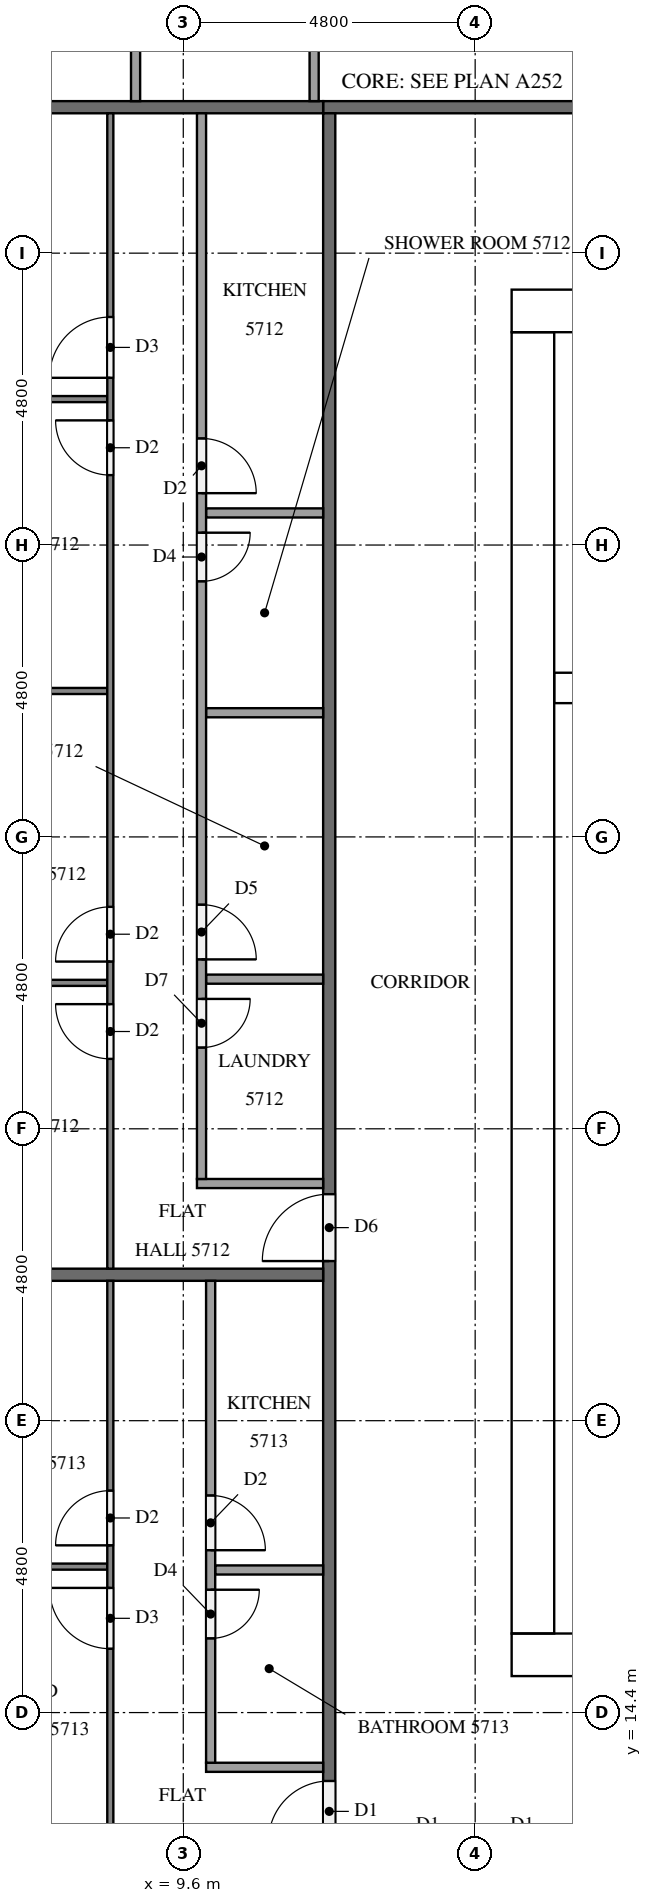
"""IFC4 building model, lengths in metres.
Left out: names, types, materials, properties, quantities, classifications, styles, units other than length and angle.
Written with IfcOpenShell. Run it as: python <this file> out.ifc"""

import sys

from ifc_helpers import new_model, si_unit, direction, frame, frame_2d, origin, place, context, subcontext, project, spatial, rectangle, extrude, element, fill, save


model = new_model("IFC4")
c1 = context("Model", 3, precision=1e-05, world=origin(), true_north=direction((0.0, 1.0)))
c2 = subcontext(c1, "Body", "Model", "MODEL_VIEW")
j1 = project(units=[si_unit("LENGTHUNIT", "METRE"), si_unit("PLANEANGLEUNIT", "RADIAN")], contexts=[c1])
p1 = place(None, origin())
s1 = spatial("IfcSite", under=j1, at=p1, CompositionType="ELEMENT")
p2 = place(p1, origin())
s2 = spatial("IfcBuilding", under=s1, at=p2, CompositionType="ELEMENT")
p3 = place(p2, frame((0.0, 0.0, 219.3)))
s3 = spatial("IfcBuildingStorey", under=s2, at=p3, CompositionType="ELEMENT", Elevation=219.3)
p4 = place(p3, frame((15.0, 15.35, 0.0), z_axis=(0.0, 0.0, 1.0), x_axis=(1.0, 0.0, 0.0)))
e1 = element("IfcWall", 1, at=p4, inside=s3, PredefinedType="SHEAR", context=c2, shape_type="SweptSolid", body=[
    extrude(rectangle(XDim=32.4, YDim=0.7, at=frame_2d((16.2, 0.0))), origin(), (0.0, 0.0, 1.0), 3.2),
])
p5 = place(p4, frame((15.3, 0.0, 0.0)))
e2 = element("IfcOpeningElement", 2, at=p5, cuts=e1, PredefinedType="OPENING", context=c2, shape_type="SweptSolid", body=[
    extrude(rectangle(XDim=1.8, YDim=2.1, at=frame_2d((0.9, 1.05))), frame((0.0, 0.36, 0.0), z_axis=(0.0, -1.0, 0.0), x_axis=(1.0, 0.0, 0.0)), (0.0, 0.0, 1.0), 0.72),
])
p6 = place(p3, frame((15.0, 37.45, 0.0), z_axis=(0.0, 0.0, 1.0), x_axis=(1.0, 0.0, 0.0)))
e3 = element("IfcWall", 3, at=p6, inside=s3, PredefinedType="SHEAR", context=c2, shape_type="SweptSolid", body=[
    extrude(rectangle(XDim=32.4, YDim=0.7, at=frame_2d((16.2, 0.0))), origin(), (0.0, 0.0, 1.0), 3.2),
])
p7 = place(p6, frame((15.3, 0.0, 0.0)))
e4 = element("IfcOpeningElement", 4, at=p7, cuts=e3, PredefinedType="OPENING", context=c2, shape_type="SweptSolid", body=[
    extrude(rectangle(XDim=1.8, YDim=2.1, at=frame_2d((0.9, 1.05))), frame((0.0, 0.36, 0.0), z_axis=(0.0, -1.0, 0.0), x_axis=(1.0, 0.0, 0.0)), (0.0, 0.0, 1.0), 0.72),
])
p8 = place(p6, frame((1.544, 0.0, 0.0)))
e5 = element("IfcOpeningElement", 5, at=p8, cuts=e3, PredefinedType="OPENING", context=c2, shape_type="SweptSolid", body=[
    extrude(rectangle(XDim=1.0, YDim=2.1, at=frame_2d((0.5, 1.05))), frame((0.0, 0.36, 0.0), z_axis=(0.0, -1.0, 0.0), x_axis=(1.0, 0.0, 0.0)), (0.0, 0.0, 1.0), 0.72),
])
p9 = place(p6, frame((5.219, 0.0, 0.0)))
e6 = element("IfcOpeningElement", 6, at=p9, cuts=e3, PredefinedType="OPENING", context=c2, shape_type="SweptSolid", body=[
    extrude(rectangle(XDim=1.0, YDim=2.1, at=frame_2d((0.5, 1.05))), frame((0.0, 0.36, 0.0), z_axis=(0.0, -1.0, 0.0), x_axis=(1.0, 0.0, 0.0)), (0.0, 0.0, 1.0), 0.72),
])
p10 = place(p3, frame((15.35, 15.7, 0.0), z_axis=(0.0, 0.0, 1.0), x_axis=(0.0, 1.0, 0.0)))
e7 = element("IfcWall", 7, at=p10, inside=s3, PredefinedType="SHEAR", context=c2, shape_type="SweptSolid", body=[
    extrude(rectangle(XDim=21.4, YDim=0.7, at=frame_2d((10.7, 0.0))), origin(), (0.0, 0.0, 1.0), 3.2),
])
p11 = place(p10, frame((5.06, 0.0, 0.0)))
e8 = element("IfcOpeningElement", 8, at=p11, cuts=e7, PredefinedType="OPENING", context=c2, shape_type="SweptSolid", body=[
    extrude(rectangle(XDim=1.2, YDim=2.1, at=frame_2d((0.6, 1.05))), frame((0.0, 0.36, 0.0), z_axis=(0.0, -1.0, 0.0), x_axis=(1.0, 0.0, 0.0)), (0.0, 0.0, 1.0), 0.72),
])
p12 = place(p3, frame((15.7, 31.25, 0.0), z_axis=(0.0, 0.0, 1.0), x_axis=(1.0, 0.0, 0.0)))
e9 = element("IfcWall", 9, at=p12, inside=s3, PredefinedType="SHEAR", context=c2, shape_type="SweptSolid", body=[
    extrude(rectangle(XDim=7.15, YDim=0.5, at=frame_2d((3.575, 0.0))), origin(), (0.0, 0.0, 1.0), 3.2),
])
p13 = place(p3, frame((11.9, 40.8, 0.0), z_axis=(0.0, 0.0, 1.0), x_axis=(1.0, 0.0, 0.0)))
e10 = element("IfcWall", 10, at=p13, inside=s3, PredefinedType="PARTITIONING", context=c2, shape_type="SweptSolid", body=[
    extrude(rectangle(XDim=38.6, YDim=0.2, at=frame_2d((19.3, 0.0))), origin(), (0.0, 0.0, 1.0), 3.2),
])
p14 = place(p13, frame((33.975, 0.0, 0.0)))
e11 = element("IfcOpeningElement", 11, at=p14, cuts=e10, PredefinedType="OPENING", context=c2, shape_type="SweptSolid", body=[
    extrude(rectangle(XDim=1.0, YDim=2.1, at=frame_2d((0.5, 1.05))), frame((0.0, 0.11, 0.0), z_axis=(0.0, -1.0, 0.0), x_axis=(1.0, 0.0, 0.0)), (0.0, 0.0, 1.0), 0.22),
])
p15 = place(p13, frame((14.725, 0.0, 0.0)))
e12 = element("IfcOpeningElement", 12, at=p15, cuts=e10, PredefinedType="OPENING", context=c2, shape_type="SweptSolid", body=[
    extrude(rectangle(XDim=1.1, YDim=2.1, at=frame_2d((0.55, 1.05))), frame((0.0, 0.11, 0.0), z_axis=(0.0, -1.0, 0.0), x_axis=(1.0, 0.0, 0.0)), (0.0, 0.0, 1.0), 0.22),
])
p16 = place(p13, frame((7.575, 0.0, 0.0)))
e13 = element("IfcOpeningElement", 13, at=p16, cuts=e10, PredefinedType="OPENING", context=c2, shape_type="SweptSolid", body=[
    extrude(rectangle(XDim=1.0, YDim=2.1, at=frame_2d((0.5, 1.05))), frame((0.0, 0.11, 0.0), z_axis=(0.0, -1.0, 0.0), x_axis=(1.0, 0.0, 0.0)), (0.0, 0.0, 1.0), 0.22),
])
p17 = place(p13, frame((6.025, 0.0, 0.0)))
e14 = element("IfcOpeningElement", 14, at=p17, cuts=e10, PredefinedType="OPENING", context=c2, shape_type="SweptSolid", body=[
    extrude(rectangle(XDim=1.0, YDim=2.1, at=frame_2d((0.5, 1.05))), frame((0.0, 0.11, 0.0), z_axis=(0.0, -1.0, 0.0), x_axis=(1.0, 0.0, 0.0)), (0.0, 0.0, 1.0), 0.22),
])
p18 = place(p3, frame((12.0, 12.1, 0.0), z_axis=(0.0, 0.0, 1.0), x_axis=(0.0, 1.0, 0.0)))
e15 = element("IfcWall", 15, at=p18, inside=s3, PredefinedType="PARTITIONING", context=c2, shape_type="SweptSolid", body=[
    extrude(rectangle(XDim=28.6, YDim=0.2, at=frame_2d((14.3, 0.0))), origin(), (0.0, 0.0, 1.0), 3.2),
])
p19 = place(p18, frame((9.725, 0.0, 0.0)))
e16 = element("IfcOpeningElement", 16, at=p19, cuts=e15, PredefinedType="OPENING", context=c2, shape_type="SweptSolid", body=[
    extrude(rectangle(XDim=1.1, YDim=2.1, at=frame_2d((0.55, 1.05))), frame((0.0, 0.11, 0.0), z_axis=(0.0, -1.0, 0.0), x_axis=(1.0, 0.0, 0.0)), (0.0, 0.0, 1.0), 0.22),
])
p20 = place(p18, frame((0.175, 0.0, 0.0)))
e17 = element("IfcOpeningElement", 17, at=p20, cuts=e15, PredefinedType="OPENING", context=c2, shape_type="SweptSolid", body=[
    extrude(rectangle(XDim=1.0, YDim=2.1, at=frame_2d((0.5, 1.05))), frame((0.0, 0.11, 0.0), z_axis=(0.0, -1.0, 0.0), x_axis=(1.0, 0.0, 0.0)), (0.0, 0.0, 1.0), 0.22),
])
for number, where, z_axis, x_axis in (
    (18, (4.9, 40.8, 0.0), (0.0, 0.0, 1.0), (1.0, 0.0, 0.0)),
    (19, (4.9, 21.6, 0.0), (0.0, 0.0, 1.0), (1.0, 0.0, 0.0)),
):
    element("IfcWall", number, at=place(p3, frame(where, z_axis=z_axis, x_axis=x_axis)), inside=s3, PredefinedType="PARTITIONING", context=c2, shape_type="SweptSolid", body=[
        extrude(rectangle(XDim=7.0, YDim=0.2, at=frame_2d((3.5, 0.0))), origin(), (0.0, 0.0, 1.0), 3.2),
    ])
for number, where, z_axis, x_axis in (
    (20, (11.752, 40.9, 0.0), (0.0, 0.0, 1.0), (0.0, 1.0, 0.0)),
    (21, (8.815, 40.9, 0.0), (0.0, 0.0, 1.0), (0.0, 1.0, 0.0)),
):
    element("IfcWall", number, at=place(p3, frame(where, z_axis=z_axis, x_axis=x_axis)), inside=s3, PredefinedType="PARTITIONING", context=c2, shape_type="SweptSolid", body=[
        extrude(rectangle(XDim=2.975, YDim=0.15, at=frame_2d((1.488, 0.0))), origin(), (0.0, 0.0, 1.0), 3.2),
    ])
for number, where, z_axis, x_axis in (
    (22, (8.35, 26.4, 0.0), (0.0, 0.0, 1.0), (-1.0, 0.0, 0.0)),
    (23, (8.35, 31.2, 0.0), (0.0, 0.0, 1.0), (-1.0, 0.0, 0.0)),
    (24, (8.35, 36.0, 0.0), (0.0, 0.0, 1.0), (-1.0, 0.0, 0.0)),
):
    element("IfcWall", number, at=place(p3, frame(where, z_axis=z_axis, x_axis=x_axis)), inside=s3, PredefinedType="PARTITIONING", context=c2, shape_type="SweptSolid", body=[
        extrude(rectangle(XDim=3.45, YDim=0.1, at=frame_2d((1.725, 0.0))), origin(), (0.0, 0.0, 1.0), 3.2),
    ])
p21 = place(p3, frame((8.4, 21.7, 0.0), z_axis=(0.0, 0.0, 1.0), x_axis=(0.0, 1.0, 0.0)))
e25 = element("IfcWall", 25, at=p21, inside=s3, PredefinedType="PARTITIONING", context=c2, shape_type="SweptSolid", body=[
    extrude(rectangle(XDim=19.0, YDim=0.1, at=frame_2d((9.5, 0.0))), origin(), (0.0, 0.0, 1.0), 3.2),
])
p22 = place(p21, frame((3.45, 0.0, 0.0)))
e26 = element("IfcOpeningElement", 26, at=p22, cuts=e25, PredefinedType="OPENING", context=c2, shape_type="SweptSolid", body=[
    extrude(rectangle(XDim=0.9, YDim=2.1, at=frame_2d((0.45, 1.05))), frame((0.0, 0.06, 0.0), z_axis=(0.0, -1.0, 0.0), x_axis=(1.0, 0.0, 0.0)), (0.0, 0.0, 1.0), 0.12),
])
p23 = place(p21, frame((5.05, 0.0, 0.0)))
e27 = element("IfcOpeningElement", 27, at=p23, cuts=e25, PredefinedType="OPENING", context=c2, shape_type="SweptSolid", body=[
    extrude(rectangle(XDim=0.9, YDim=2.1, at=frame_2d((0.45, 1.05))), frame((0.0, 0.06, 0.0), z_axis=(0.0, -1.0, 0.0), x_axis=(1.0, 0.0, 0.0)), (0.0, 0.0, 1.0), 0.12),
])
p24 = place(p21, frame((13.05, 0.0, 0.0)))
e28 = element("IfcOpeningElement", 28, at=p24, cuts=e25, PredefinedType="OPENING", context=c2, shape_type="SweptSolid", body=[
    extrude(rectangle(XDim=0.9, YDim=2.1, at=frame_2d((0.45, 1.05))), frame((0.0, 0.06, 0.0), z_axis=(0.0, -1.0, 0.0), x_axis=(1.0, 0.0, 0.0)), (0.0, 0.0, 1.0), 0.12),
])
p25 = place(p21, frame((14.65, 0.0, 0.0)))
e29 = element("IfcOpeningElement", 29, at=p25, cuts=e25, PredefinedType="OPENING", context=c2, shape_type="SweptSolid", body=[
    extrude(rectangle(XDim=1.0, YDim=2.1, at=frame_2d((0.5, 1.05))), frame((0.0, 0.06, 0.0), z_axis=(0.0, -1.0, 0.0), x_axis=(1.0, 0.0, 0.0)), (0.0, 0.0, 1.0), 0.12),
])
for number, where, z_axis, x_axis in (
    (30, (11.9, 26.461, 0.0), (0.0, 0.0, 1.0), (-1.0, 0.0, 0.0)),
    (31, (11.9, 30.842, 0.0), (0.0, 0.0, 1.0), (-1.0, 0.0, 0.0)),
    (32, (11.9, 34.128, 0.0), (0.0, 0.0, 1.0), (-1.0, 0.0, 0.0)),
):
    element("IfcWall", number, at=place(p3, frame(where, z_axis=z_axis, x_axis=x_axis)), inside=s3, PredefinedType="PARTITIONING", context=c2, shape_type="SweptSolid", body=[
        extrude(rectangle(XDim=1.925, YDim=0.15, at=frame_2d((0.962, 0.0))), origin(), (0.0, 0.0, 1.0), 3.2),
    ])
p26 = place(p3, frame((11.9, 23.1, 0.0), z_axis=(0.0, 0.0, 1.0), x_axis=(-1.0, 0.0, 0.0)))
e33 = element("IfcWall", 33, at=p26, inside=s3, PredefinedType="PARTITIONING", context=c2, shape_type="SweptSolid", body=[
    extrude(rectangle(XDim=2.075, YDim=0.15, at=frame_2d((1.038, 0.0))), origin(), (0.0, 0.0, 1.0), 3.2),
])
p27 = place(p3, frame((9.9, 40.7, 0.0), z_axis=(0.0, 0.0, 1.0), x_axis=(0.0, -1.0, 0.0)))
e34 = element("IfcWall", 34, at=p27, inside=s3, PredefinedType="PARTITIONING", context=c2, shape_type="SweptSolid", body=[
    extrude(rectangle(XDim=17.525, YDim=0.15, at=frame_2d((8.762, 0.0))), origin(), (0.0, 0.0, 1.0), 3.2),
])
p28 = place(p27, frame((14.564, 0.0, 0.0)))
e35 = element("IfcOpeningElement", 35, at=p28, cuts=e34, PredefinedType="OPENING", context=c2, shape_type="SweptSolid", body=[
    extrude(rectangle(XDim=0.8, YDim=2.1, at=frame_2d((0.4, 1.05))), frame((0.0, 0.085, 0.0), z_axis=(0.0, -1.0, 0.0), x_axis=(1.0, 0.0, 0.0)), (0.0, 0.0, 1.0), 0.17),
])
p29 = place(p27, frame((13.014, 0.0, 0.0)))
e36 = element("IfcOpeningElement", 36, at=p29, cuts=e34, PredefinedType="OPENING", context=c2, shape_type="SweptSolid", body=[
    extrude(rectangle(XDim=0.9, YDim=2.1, at=frame_2d((0.45, 1.05))), frame((0.0, 0.085, 0.0), z_axis=(0.0, -1.0, 0.0), x_axis=(1.0, 0.0, 0.0)), (0.0, 0.0, 1.0), 0.17),
])
p30 = place(p27, frame((6.897, 0.0, 0.0)))
e37 = element("IfcOpeningElement", 37, at=p30, cuts=e34, PredefinedType="OPENING", context=c2, shape_type="SweptSolid", body=[
    extrude(rectangle(XDim=0.8, YDim=2.1, at=frame_2d((0.4, 1.05))), frame((0.0, 0.085, 0.0), z_axis=(0.0, -1.0, 0.0), x_axis=(1.0, 0.0, 0.0)), (0.0, 0.0, 1.0), 0.17),
])
p31 = place(p27, frame((5.347, 0.0, 0.0)))
e38 = element("IfcOpeningElement", 38, at=p31, cuts=e34, PredefinedType="OPENING", context=c2, shape_type="SweptSolid", body=[
    extrude(rectangle(XDim=0.9, YDim=2.1, at=frame_2d((0.45, 1.05))), frame((0.0, 0.085, 0.0), z_axis=(0.0, -1.0, 0.0), x_axis=(1.0, 0.0, 0.0)), (0.0, 0.0, 1.0), 0.17),
])
p32 = place(p3, frame((8.35, 16.8, 0.0), z_axis=(0.0, 0.0, 1.0), x_axis=(-1.0, 0.0, 0.0)))
e39 = element("IfcWall", 39, at=p32, inside=s3, PredefinedType="PARTITIONING", context=c2, shape_type="SweptSolid", body=[
    extrude(rectangle(XDim=3.45, YDim=0.1, at=frame_2d((1.725, 0.0))), origin(), (0.0, 0.0, 1.0), 3.2),
])
p33 = place(p3, frame((8.4, 12.1, 0.0), z_axis=(0.0, 0.0, 1.0), x_axis=(0.0, 1.0, 0.0)))
e40 = element("IfcWall", 40, at=p33, inside=s3, PredefinedType="PARTITIONING", context=c2, shape_type="SweptSolid", body=[
    extrude(rectangle(XDim=9.4, YDim=0.1, at=frame_2d((4.7, 0.0))), origin(), (0.0, 0.0, 1.0), 3.2),
])
p34 = place(p33, frame((3.35, 0.0, 0.0)))
e41 = element("IfcOpeningElement", 41, at=p34, cuts=e40, PredefinedType="OPENING", context=c2, shape_type="SweptSolid", body=[
    extrude(rectangle(XDim=1.0, YDim=2.1, at=frame_2d((0.5, 1.05))), frame((0.0, 0.06, 0.0), z_axis=(0.0, -1.0, 0.0), x_axis=(1.0, 0.0, 0.0)), (0.0, 0.0, 1.0), 0.12),
])
p35 = place(p33, frame((5.05, 0.0, 0.0)))
e42 = element("IfcOpeningElement", 42, at=p35, cuts=e40, PredefinedType="OPENING", context=c2, shape_type="SweptSolid", body=[
    extrude(rectangle(XDim=0.9, YDim=2.1, at=frame_2d((0.45, 1.05))), frame((0.0, 0.06, 0.0), z_axis=(0.0, -1.0, 0.0), x_axis=(1.0, 0.0, 0.0)), (0.0, 0.0, 1.0), 0.12),
])
p36 = place(p3, frame((11.9, 16.745, 0.0), z_axis=(0.0, 0.0, 1.0), x_axis=(-1.0, 0.0, 0.0)))
e43 = element("IfcWall", 43, at=p36, inside=s3, PredefinedType="PARTITIONING", context=c2, shape_type="SweptSolid", body=[
    extrude(rectangle(XDim=1.775, YDim=0.15, at=frame_2d((0.887, 0.0))), origin(), (0.0, 0.0, 1.0), 3.2),
])
p37 = place(p3, frame((11.9, 13.5, 0.0), z_axis=(0.0, 0.0, 1.0), x_axis=(-1.0, 0.0, 0.0)))
e44 = element("IfcWall", 44, at=p37, inside=s3, PredefinedType="PARTITIONING", context=c2, shape_type="SweptSolid", body=[
    extrude(rectangle(XDim=1.925, YDim=0.15, at=frame_2d((0.962, 0.0))), origin(), (0.0, 0.0, 1.0), 3.2),
])
p38 = place(p3, frame((10.05, 21.5, 0.0), z_axis=(0.0, 0.0, 1.0), x_axis=(0.0, -1.0, 0.0)))
e45 = element("IfcWall", 45, at=p38, inside=s3, PredefinedType="PARTITIONING", context=c2, shape_type="SweptSolid", body=[
    extrude(rectangle(XDim=7.925, YDim=0.15, at=frame_2d((3.962, 0.0))), origin(), (0.0, 0.0, 1.0), 3.2),
])
p39 = place(p38, frame((5.08, 0.0, 0.0)))
e46 = element("IfcOpeningElement", 46, at=p39, cuts=e45, PredefinedType="OPENING", context=c2, shape_type="SweptSolid", body=[
    extrude(rectangle(XDim=0.8, YDim=2.1, at=frame_2d((0.4, 1.05))), frame((0.0, 0.085, 0.0), z_axis=(0.0, -1.0, 0.0), x_axis=(1.0, 0.0, 0.0)), (0.0, 0.0, 1.0), 0.17),
])
p40 = place(p38, frame((3.53, 0.0, 0.0)))
e47 = element("IfcOpeningElement", 47, at=p40, cuts=e45, PredefinedType="OPENING", context=c2, shape_type="SweptSolid", body=[
    extrude(rectangle(XDim=0.9, YDim=2.1, at=frame_2d((0.45, 1.05))), frame((0.0, 0.085, 0.0), z_axis=(0.0, -1.0, 0.0), x_axis=(1.0, 0.0, 0.0)), (0.0, 0.0, 1.0), 0.17),
])
p41 = place(p11, frame((1.2, 0.0, 0.0), z_axis=(0.0, 0.0, 1.0), x_axis=(-1.0, 0.0, 0.0)))
e48 = element("IfcDoor", 48, at=p41, inside=s3, OperationType="SINGLE_SWING_RIGHT", PredefinedType="DOOR", context=c2, shape_type="SweptSolid", body=[
    extrude(rectangle(XDim=1.2, YDim=2.1, at=frame_2d((0.6, 1.05))), frame((0.0, 0.025, 0.0), z_axis=(0.0, -1.0, 0.0), x_axis=(1.0, 0.0, 0.0)), (0.0, 0.0, 1.0), 0.05),
])
fill(e8, e48)
p42 = place(p19, origin())
e49 = element("IfcDoor", 49, at=p42, inside=s3, OperationType="SINGLE_SWING_LEFT", PredefinedType="DOOR", context=c2, shape_type="SweptSolid", body=[
    extrude(rectangle(XDim=1.1, YDim=2.1, at=frame_2d((0.55, 1.05))), frame((0.0, 0.025, 0.0), z_axis=(0.0, -1.0, 0.0), x_axis=(1.0, 0.0, 0.0)), (0.0, 0.0, 1.0), 0.05),
])
fill(e16, e49)
p43 = place(p20, origin())
e50 = element("IfcDoor", 50, at=p43, inside=s3, OperationType="SINGLE_SWING_LEFT", PredefinedType="DOOR", context=c2, shape_type="SweptSolid", body=[
    extrude(rectangle(XDim=1.0, YDim=2.1, at=frame_2d((0.5, 1.05))), frame((0.0, 0.025, 0.0), z_axis=(0.0, -1.0, 0.0), x_axis=(1.0, 0.0, 0.0)), (0.0, 0.0, 1.0), 0.05),
])
fill(e17, e50)
p44 = place(p22, origin())
e51 = element("IfcDoor", 51, at=p44, inside=s3, OperationType="SINGLE_SWING_RIGHT", PredefinedType="DOOR", context=c2, shape_type="SweptSolid", body=[
    extrude(rectangle(XDim=0.9, YDim=2.1, at=frame_2d((0.45, 1.05))), frame((0.0, 0.025, 0.0), z_axis=(0.0, -1.0, 0.0), x_axis=(1.0, 0.0, 0.0)), (0.0, 0.0, 1.0), 0.05),
])
fill(e26, e51)
p45 = place(p23, origin())
e52 = element("IfcDoor", 52, at=p45, inside=s3, OperationType="SINGLE_SWING_LEFT", PredefinedType="DOOR", context=c2, shape_type="SweptSolid", body=[
    extrude(rectangle(XDim=0.9, YDim=2.1, at=frame_2d((0.45, 1.05))), frame((0.0, 0.025, 0.0), z_axis=(0.0, -1.0, 0.0), x_axis=(1.0, 0.0, 0.0)), (0.0, 0.0, 1.0), 0.05),
])
fill(e27, e52)
p46 = place(p24, origin())
e53 = element("IfcDoor", 53, at=p46, inside=s3, OperationType="SINGLE_SWING_RIGHT", PredefinedType="DOOR", context=c2, shape_type="SweptSolid", body=[
    extrude(rectangle(XDim=0.9, YDim=2.1, at=frame_2d((0.45, 1.05))), frame((0.0, 0.025, 0.0), z_axis=(0.0, -1.0, 0.0), x_axis=(1.0, 0.0, 0.0)), (0.0, 0.0, 1.0), 0.05),
])
fill(e28, e53)
p47 = place(p25, origin())
e54 = element("IfcDoor", 54, at=p47, inside=s3, OperationType="SINGLE_SWING_LEFT", PredefinedType="DOOR", context=c2, shape_type="SweptSolid", body=[
    extrude(rectangle(XDim=1.0, YDim=2.1, at=frame_2d((0.5, 1.05))), frame((0.0, 0.025, 0.0), z_axis=(0.0, -1.0, 0.0), x_axis=(1.0, 0.0, 0.0)), (0.0, 0.0, 1.0), 0.05),
])
fill(e29, e54)
p48 = place(p28, origin())
e55 = element("IfcDoor", 55, at=p48, inside=s3, OperationType="SINGLE_SWING_LEFT", PredefinedType="DOOR", context=c2, shape_type="SweptSolid", body=[
    extrude(rectangle(XDim=0.8, YDim=2.1, at=frame_2d((0.4, 1.05))), frame((0.0, 0.025, 0.0), z_axis=(0.0, -1.0, 0.0), x_axis=(1.0, 0.0, 0.0)), (0.0, 0.0, 1.0), 0.05),
])
fill(e35, e55)
p49 = place(p29, origin())
e56 = element("IfcDoor", 56, at=p49, inside=s3, OperationType="SINGLE_SWING_RIGHT", PredefinedType="DOOR", context=c2, shape_type="SweptSolid", body=[
    extrude(rectangle(XDim=0.9, YDim=2.1, at=frame_2d((0.45, 1.05))), frame((0.0, 0.025, 0.0), z_axis=(0.0, -1.0, 0.0), x_axis=(1.0, 0.0, 0.0)), (0.0, 0.0, 1.0), 0.05),
])
fill(e36, e56)
p50 = place(p30, origin())
e57 = element("IfcDoor", 57, at=p50, inside=s3, OperationType="SINGLE_SWING_LEFT", PredefinedType="DOOR", context=c2, shape_type="SweptSolid", body=[
    extrude(rectangle(XDim=0.8, YDim=2.1, at=frame_2d((0.4, 1.05))), frame((0.0, 0.025, 0.0), z_axis=(0.0, -1.0, 0.0), x_axis=(1.0, 0.0, 0.0)), (0.0, 0.0, 1.0), 0.05),
])
fill(e37, e57)
p51 = place(p31, origin())
e58 = element("IfcDoor", 58, at=p51, inside=s3, OperationType="SINGLE_SWING_RIGHT", PredefinedType="DOOR", context=c2, shape_type="SweptSolid", body=[
    extrude(rectangle(XDim=0.9, YDim=2.1, at=frame_2d((0.45, 1.05))), frame((0.0, 0.025, 0.0), z_axis=(0.0, -1.0, 0.0), x_axis=(1.0, 0.0, 0.0)), (0.0, 0.0, 1.0), 0.05),
])
fill(e38, e58)
p52 = place(p34, origin())
e59 = element("IfcDoor", 59, at=p52, inside=s3, OperationType="SINGLE_SWING_RIGHT", PredefinedType="DOOR", context=c2, shape_type="SweptSolid", body=[
    extrude(rectangle(XDim=1.0, YDim=2.1, at=frame_2d((0.5, 1.05))), frame((0.0, 0.025, 0.0), z_axis=(0.0, -1.0, 0.0), x_axis=(1.0, 0.0, 0.0)), (0.0, 0.0, 1.0), 0.05),
])
fill(e41, e59)
p53 = place(p35, origin())
e60 = element("IfcDoor", 60, at=p53, inside=s3, OperationType="SINGLE_SWING_LEFT", PredefinedType="DOOR", context=c2, shape_type="SweptSolid", body=[
    extrude(rectangle(XDim=0.9, YDim=2.1, at=frame_2d((0.45, 1.05))), frame((0.0, 0.025, 0.0), z_axis=(0.0, -1.0, 0.0), x_axis=(1.0, 0.0, 0.0)), (0.0, 0.0, 1.0), 0.05),
])
fill(e42, e60)
p54 = place(p39, origin())
e61 = element("IfcDoor", 61, at=p54, inside=s3, OperationType="SINGLE_SWING_LEFT", PredefinedType="DOOR", context=c2, shape_type="SweptSolid", body=[
    extrude(rectangle(XDim=0.8, YDim=2.1, at=frame_2d((0.4, 1.05))), frame((0.0, 0.025, 0.0), z_axis=(0.0, -1.0, 0.0), x_axis=(1.0, 0.0, 0.0)), (0.0, 0.0, 1.0), 0.05),
])
fill(e46, e61)
p55 = place(p40, origin())
e62 = element("IfcDoor", 62, at=p55, inside=s3, OperationType="SINGLE_SWING_RIGHT", PredefinedType="DOOR", context=c2, shape_type="SweptSolid", body=[
    extrude(rectangle(XDim=0.9, YDim=2.1, at=frame_2d((0.45, 1.05))), frame((0.0, 0.025, 0.0), z_axis=(0.0, -1.0, 0.0), x_axis=(1.0, 0.0, 0.0)), (0.0, 0.0, 1.0), 0.05),
])
fill(e47, e62)
save(model, sys.argv[1])
